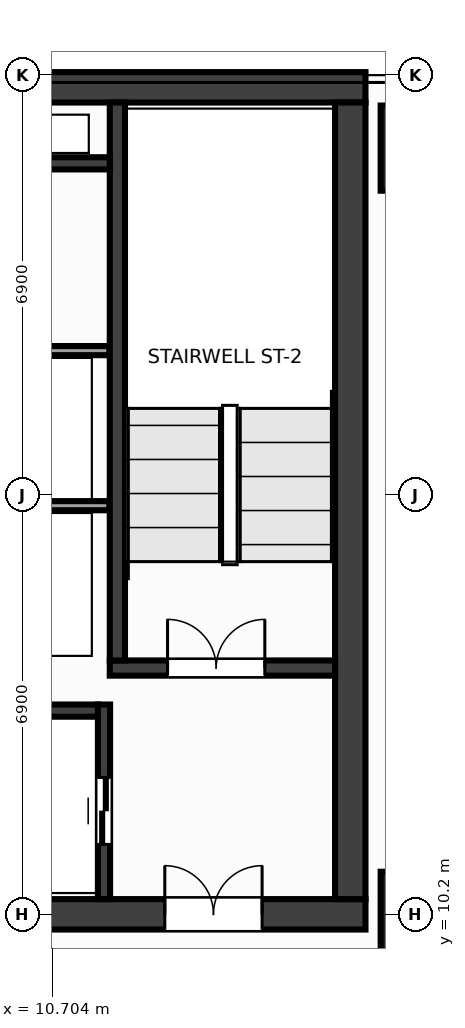
"""IFC4 building model, lengths in metres.
Left out: names, types, materials, properties, quantities, classifications, styles, units other than length and angle.
Written with IfcOpenShell. Run it as: python <this file> out.ifc"""

import sys

from ifc_helpers import new_model, si_unit, direction, frame, frame_2d, origin, origin_2d, place, context, subcontext, project, spatial, rectangle, extrude, source, transform, mapped, element, fill, save


model = new_model("IFC4")
c1 = context("Model", 3, precision=1e-05, world=origin(), true_north=direction((0.0, 1.0)))
c2 = subcontext(c1, "Body", "Model", "MODEL_VIEW")
j1 = project(units=[si_unit("LENGTHUNIT", "METRE"), si_unit("PLANEANGLEUNIT", "RADIAN")], contexts=[c1])
p1 = place(None, origin())
s1 = spatial("IfcSite", under=j1, at=p1, CompositionType="ELEMENT")
p2 = place(p1, origin())
s2 = spatial("IfcBuilding", under=s1, at=p2, CompositionType="ELEMENT")
p3 = place(p2, frame((0.0, 0.0, 225.2)))
s3 = spatial("IfcBuildingStorey", under=s2, at=p3, CompositionType="ELEMENT", Elevation=225.2)
m1 = source(origin(), c2, "Body", "SweptSolid", [
    extrude(rectangle(XDim=31.7, YDim=0.5, at=frame_2d((15.85, 0.0))), origin(), (0.0, 0.0, 1.0), 3.6),
])
p4 = place(p3, frame((-15.85, 23.8, 0.0), z_axis=(0.0, 0.0, 1.0), x_axis=(1.0, 0.0, 0.0)))
e1 = element("IfcWall", 1, at=p4, inside=s3, PredefinedType="SHEAR", context=c2, shape_type="MappedRepresentation", body=[
    mapped(m1, transform((0.0, 0.0, 0.0), x_axis=(1.0, 0.0, 0.0), y_axis=(0.0, 1.0, 0.0), z_axis=(0.0, 0.0, 1.0), scale=1.0)),
])
p5 = place(p3, frame((-15.85, 10.2, 0.0), z_axis=(0.0, 0.0, 1.0), x_axis=(1.0, 0.0, 0.0)))
e2 = element("IfcWall", 2, at=p5, inside=s3, PredefinedType="SHEAR", context=c2, shape_type="MappedRepresentation", body=[
    mapped(m1, transform((0.0, 0.0, 0.0), x_axis=(1.0, 0.0, 0.0), y_axis=(0.0, 1.0, 0.0), z_axis=(0.0, 0.0, 1.0), scale=1.0)),
])
p6 = place(p5, frame((1.7, 0.0, 0.0)))
e3 = element("IfcOpeningElement", 3, at=p6, cuts=e2, PredefinedType="OPENING", context=c2, shape_type="SweptSolid", body=[
    extrude(rectangle(XDim=1.6, YDim=2.15, at=frame_2d((0.8, 1.075))), frame((0.0, 0.262, 0.0), z_axis=(0.0, -1.0, 0.0), x_axis=(1.0, 0.0, 0.0)), (0.0, 0.0, 1.0), 0.524),
])
p7 = place(p5, frame((28.4, 0.0, 0.0)))
e4 = element("IfcOpeningElement", 4, at=p7, cuts=e2, PredefinedType="OPENING", context=c2, shape_type="SweptSolid", body=[
    extrude(rectangle(XDim=1.6, YDim=2.15, at=frame_2d((0.8, 1.075))), frame((0.0, 0.262, 0.0), z_axis=(0.0, -1.0, 0.0), x_axis=(1.0, 0.0, 0.0)), (0.0, 0.0, 1.0), 0.524),
])
p8 = place(p5, frame((15.1, 0.0, 0.0)))
e5 = element("IfcOpeningElement", 5, at=p8, cuts=e2, PredefinedType="OPENING", context=c2, shape_type="SweptSolid", body=[
    extrude(rectangle(XDim=1.5, YDim=2.2, at=frame_2d((0.75, 1.1))), frame((0.0, 0.262, 0.0), z_axis=(0.0, -1.0, 0.0), x_axis=(1.0, 0.0, 0.0)), (0.0, 0.0, 1.0), 0.524),
])
m2 = source(origin(), c2, "Body", "SweptSolid", [
    extrude(rectangle(XDim=13.1, YDim=0.5, at=frame_2d((6.55, 0.0))), origin(), (0.0, 0.0, 1.0), 3.6),
])
p9 = place(p3, frame((15.6, 10.45, 0.0), z_axis=(0.0, 0.0, 1.0), x_axis=(0.0, 1.0, 0.0)))
e6 = element("IfcWall", 6, at=p9, inside=s3, PredefinedType="SHEAR", context=c2, shape_type="MappedRepresentation", body=[
    mapped(m2, transform((0.0, 0.0, 0.0), x_axis=(1.0, 0.0, 0.0), y_axis=(0.0, 1.0, 0.0), z_axis=(0.0, 0.0, 1.0), scale=1.0)),
])
m3 = source(origin(), c2, "Body", "SweptSolid", [
    extrude(rectangle(XDim=3.705, YDim=0.25, at=frame_2d((1.853, 0.0))), origin(), (0.0, 0.0, 1.0), 3.6),
])
p10 = place(p3, frame((11.645, 14.25, 0.0), z_axis=(0.0, 0.0, 1.0), x_axis=(1.0, 0.0, 0.0)))
e7 = element("IfcWall", 7, at=p10, inside=s3, PredefinedType="SHEAR", context=c2, shape_type="MappedRepresentation", body=[
    mapped(m3, transform((0.0, 0.0, 0.0), x_axis=(1.0, 0.0, 0.0), y_axis=(0.0, 1.0, 0.0), z_axis=(0.0, 0.0, 1.0), scale=1.0)),
])
p11 = place(p10, frame((0.95, 0.0, 0.0)))
e8 = element("IfcOpeningElement", 8, at=p11, cuts=e7, PredefinedType="OPENING", context=c2, shape_type="SweptSolid", body=[
    extrude(rectangle(XDim=1.6, YDim=2.15, at=frame_2d((0.8, 1.075))), frame((0.0, 0.137, 0.0), z_axis=(0.0, -1.0, 0.0), x_axis=(1.0, 0.0, 0.0)), (0.0, 0.0, 1.0), 0.274),
])
m4 = source(origin(), c2, "Body", "SweptSolid", [
    extrude(rectangle(XDim=9.175, YDim=0.25, at=frame_2d((4.587, 0.0))), origin(), (0.0, 0.0, 1.0), 3.6),
])
p12 = place(p3, frame((11.77, 14.375, 0.0), z_axis=(0.0, 0.0, 1.0), x_axis=(0.0, 1.0, 0.0)))
e9 = element("IfcWall", 9, at=p12, inside=s3, PredefinedType="SHEAR", context=c2, shape_type="MappedRepresentation", body=[
    mapped(m4, transform((0.0, 0.0, 0.0), x_axis=(1.0, 0.0, 0.0), y_axis=(0.0, 1.0, 0.0), z_axis=(0.0, 0.0, 1.0), scale=1.0)),
])
m5 = source(origin(), c2, "Body", "SweptSolid", [
    extrude(rectangle(XDim=3.2, YDim=0.2, at=frame_2d((1.6, 0.0))), origin(), (0.0, 0.0, 1.0), 3.6),
])
p13 = place(p3, frame((11.55, 10.45, 0.0), z_axis=(0.0, 0.0, 1.0), x_axis=(0.0, 1.0, 0.0)))
e10 = element("IfcWall", 10, at=p13, inside=s3, PredefinedType="SHEAR", context=c2, shape_type="MappedRepresentation", body=[
    mapped(m5, transform((0.0, 0.0, 0.0), x_axis=(1.0, 0.0, 0.0), y_axis=(0.0, 1.0, 0.0), z_axis=(0.0, 0.0, 1.0), scale=1.0)),
])
p14 = place(p13, frame((0.9, 0.0, 0.0)))
e11 = element("IfcOpeningElement", 11, at=p14, cuts=e10, PredefinedType="OPENING", context=c2, shape_type="SweptSolid", body=[
    extrude(rectangle(XDim=1.1, YDim=2.15, at=frame_2d((0.55, 1.075))), frame((0.0, 0.112, 0.0), z_axis=(0.0, -1.0, 0.0), x_axis=(1.0, 0.0, 0.0)), (0.0, 0.0, 1.0), 0.224),
])
m6 = source(origin(), c2, "Body", "SweptSolid", [
    extrude(rectangle(XDim=2.825, YDim=0.2, at=frame_2d((1.413, 0.0))), origin(), (0.0, 0.0, 1.0), 3.6),
])
p15 = place(p3, frame((8.625, 13.55, 0.0), z_axis=(0.0, 0.0, 1.0), x_axis=(1.0, 0.0, 0.0)))
e12 = element("IfcWall", 12, at=p15, inside=s3, PredefinedType="SHEAR", context=c2, shape_type="MappedRepresentation", body=[
    mapped(m6, transform((0.0, 0.0, 0.0), x_axis=(1.0, 0.0, 0.0), y_axis=(0.0, 1.0, 0.0), z_axis=(0.0, 0.0, 1.0), scale=1.0)),
])
m7 = source(origin(), c2, "Body", "SweptSolid", [
    extrude(rectangle(XDim=3.02, YDim=0.2, at=frame_2d((1.51, 0.0))), origin(), (0.0, 0.0, 1.0), 3.6),
])
p16 = place(p3, frame((8.625, 22.55, 0.0), z_axis=(0.0, 0.0, 1.0), x_axis=(1.0, 0.0, 0.0)))
e13 = element("IfcWall", 13, at=p16, inside=s3, PredefinedType="SHEAR", context=c2, shape_type="MappedRepresentation", body=[
    mapped(m7, transform((0.0, 0.0, 0.0), x_axis=(1.0, 0.0, 0.0), y_axis=(0.0, 1.0, 0.0), z_axis=(0.0, 0.0, 1.0), scale=1.0)),
])
m8 = source(origin(), c2, "Body", "SweptSolid", [
    extrude(rectangle(XDim=1.4, YDim=1.4, at=origin_2d()), origin(), (0.0, 0.0, 1.0), 3.6),
])
for number, where, z_axis, x_axis in (
    (14, (16.8, 10.2, 0.0), (0.0, 0.0, 1.0), (1.0, 0.0, 0.0)),
    (15, (16.8, 22.8, 0.0), (0.0, 0.0, 1.0), (1.0, 0.0, 0.0)),
):
    element("IfcColumn", number, at=place(p3, frame(where, z_axis=z_axis, x_axis=x_axis)), inside=s3, PredefinedType="COLUMN", context=c2, shape_type="MappedRepresentation", body=[
        mapped(m8, transform((0.0, 0.0, 0.0), x_axis=(1.0, 0.0, 0.0), y_axis=(0.0, 1.0, 0.0), z_axis=(0.0, 0.0, 1.0), scale=1.0)),
    ])
m9 = source(origin(), c2, "Body", "SweptSolid", [
    extrude(rectangle(XDim=3.01, YDim=0.15, at=frame_2d((1.505, 0.0))), origin(), (0.0, 0.0, 1.0), 3.28),
])
for number, where, z_axis, x_axis in (
    (16, (8.63, 16.92, 0.0), (0.0, 0.0, 1.0), (1.0, 0.0, 0.0)),
    (17, (8.63, 19.47, 0.0), (0.0, 0.0, 1.0), (1.0, 0.0, 0.0)),
):
    element("IfcWall", number, at=place(p3, frame(where, z_axis=z_axis, x_axis=x_axis)), inside=s3, PredefinedType="PARTITIONING", context=c2, shape_type="MappedRepresentation", body=[
        mapped(m9, transform((0.0, 0.0, 0.0), x_axis=(1.0, 0.0, 0.0), y_axis=(0.0, 1.0, 0.0), z_axis=(0.0, 0.0, 1.0), scale=1.0)),
    ])
m10 = source(origin(), c2, "Body", "SweptSolid", [
    extrude(rectangle(XDim=1.6, YDim=2.15, at=frame_2d((0.8, 1.075))), frame((0.0, 0.025, 0.0), z_axis=(0.0, -1.0, 0.0), x_axis=(1.0, 0.0, 0.0)), (0.0, 0.0, 1.0), 0.05),
])
p17 = place(p11, origin())
e18 = element("IfcDoor", 18, at=p17, inside=s3, OperationType="DOUBLE_DOOR_SINGLE_SWING", PredefinedType="DOOR", context=c2, shape_type="MappedRepresentation", body=[
    mapped(m10, transform((0.0, 0.0, 0.0), x_axis=(1.0, 0.0, 0.0), y_axis=(0.0, 1.0, 0.0), z_axis=(0.0, 0.0, 1.0), scale=1.0)),
])
fill(e8, e18)
p18 = place(p7, origin())
e19 = element("IfcDoor", 19, at=p18, inside=s3, OperationType="DOUBLE_DOOR_SINGLE_SWING", PredefinedType="DOOR", context=c2, shape_type="MappedRepresentation", body=[
    mapped(m10, transform((0.0, 0.0, 0.0), x_axis=(1.0, 0.0, 0.0), y_axis=(0.0, 1.0, 0.0), z_axis=(0.0, 0.0, 1.0), scale=1.0)),
])
fill(e4, e19)
m11 = source(origin(), c2, "Body", "SweptSolid", [
    extrude(rectangle(XDim=1.1, YDim=2.15, at=frame_2d((0.55, 1.075))), frame((0.0, 0.025, 0.0), z_axis=(0.0, -1.0, 0.0), x_axis=(1.0, 0.0, 0.0)), (0.0, 0.0, 1.0), 0.05),
])
p19 = place(p14, origin())
e20 = element("IfcDoor", 20, at=p19, inside=s3, OperationType="DOUBLE_DOOR_SLIDING", PredefinedType="DOOR", context=c2, shape_type="MappedRepresentation", body=[
    mapped(m11, transform((0.0, 0.0, 0.0), x_axis=(1.0, 0.0, 0.0), y_axis=(0.0, 1.0, 0.0), z_axis=(0.0, 0.0, 1.0), scale=1.0)),
])
fill(e11, e20)
save(model, sys.argv[1])
